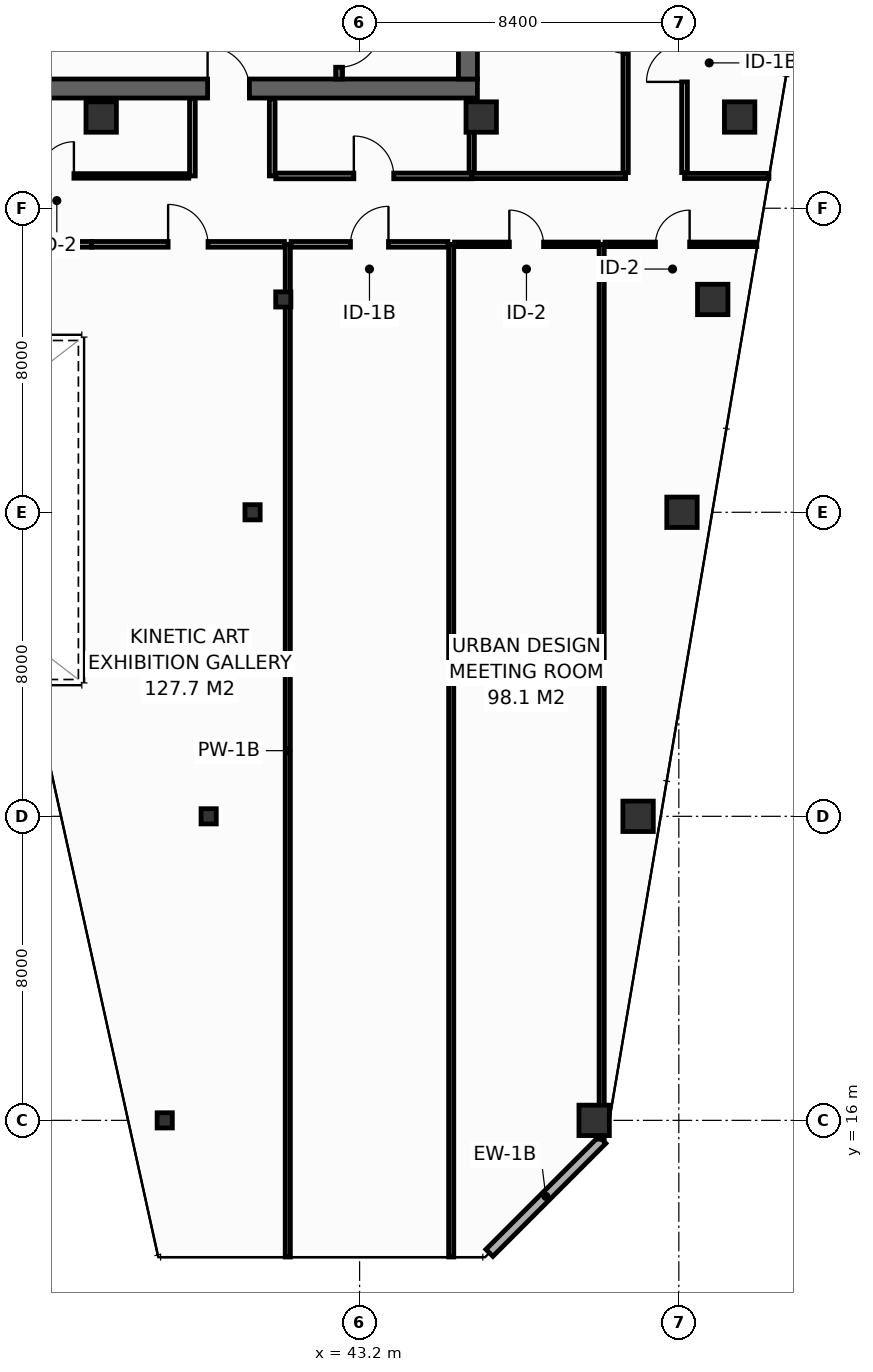
"""IFC4 building model, lengths in metres.
Left out: names, types, materials, properties, quantities, classifications, styles, units other than length and angle.
Written with IfcOpenShell. Run it as: python <this file> out.ifc"""

import sys

from ifc_helpers import new_model, si_unit, direction, frame, frame_2d, origin, origin_2d, place, context, subcontext, project, spatial, rectangle, hollow_rectangle, extrude, element, fill, save


model = new_model("IFC4")
c1 = context("Model", 3, precision=1e-05, world=origin(), true_north=direction((0.0, 1.0)))
c2 = subcontext(c1, "Body", "Model", "MODEL_VIEW")
j1 = project(units=[si_unit("LENGTHUNIT", "METRE"), si_unit("PLANEANGLEUNIT", "RADIAN")], contexts=[c1])
p1 = place(None, origin())
s1 = spatial("IfcSite", under=j1, at=p1, CompositionType="ELEMENT")
p2 = place(p1, origin())
s2 = spatial("IfcBuilding", under=s1, at=p2, CompositionType="ELEMENT")
p3 = place(p2, frame((0.0, 0.0, 205.6)))
s3 = spatial("IfcBuildingStorey", under=s2, at=p3, CompositionType="ELEMENT", Elevation=205.6)
p4 = place(p3, frame((13.6, 43.15, 0.0), z_axis=(0.0, 0.0, 1.0), x_axis=(1.0, 0.0, 0.0)))
e1 = element("IfcWall", 1, at=p4, inside=s3, PredefinedType="SHEAR", context=c2, shape_type="SweptSolid", body=[
    extrude(rectangle(XDim=32.7, YDim=0.5, at=frame_2d((16.35, 0.0))), origin(), (0.0, 0.0, 1.0), 3.55),
])
p5 = place(p4, frame((5.4, 0.0, 0.0)))
e2 = element("IfcOpeningElement", 2, at=p5, cuts=e1, PredefinedType="OPENING", context=c2, shape_type="SweptSolid", body=[
    extrude(rectangle(XDim=1.1, YDim=2.15, at=frame_2d((0.55, 1.075))), frame((0.0, 0.26, 0.0), z_axis=(0.0, -1.0, 0.0), x_axis=(1.0, 0.0, 0.0)), (0.0, 0.0, 1.0), 0.52),
])
p6 = place(p4, frame((25.6, 0.0, 0.0)))
e3 = element("IfcOpeningElement", 3, at=p6, cuts=e1, PredefinedType="OPENING", context=c2, shape_type="SweptSolid", body=[
    extrude(rectangle(XDim=1.1, YDim=2.15, at=frame_2d((0.55, 1.075))), frame((0.0, 0.26, 0.0), z_axis=(0.0, -1.0, 0.0), x_axis=(1.0, 0.0, 0.0)), (0.0, 0.0, 1.0), 0.52),
])
p7 = place(p3, frame((46.05, 43.4, 0.0), z_axis=(0.0, 0.0, 1.0), x_axis=(0.0, 1.0, 0.0)))
e4 = element("IfcWall", 4, at=p7, inside=s3, PredefinedType="SHEAR", context=c2, shape_type="SweptSolid", body=[
    extrude(rectangle(XDim=10.4, YDim=0.5, at=frame_2d((5.2, 0.0))), origin(), (0.0, 0.0, 1.0), 3.55),
])
for number, where, z_axis, x_axis in (
    (5, (36.4, 42.4, 0.0), (0.0, 0.0, 1.0), (1.0, 0.0, 0.0)),
    (6, (46.4, 42.4, 0.0), (0.0, 0.0, 1.0), (1.0, 0.0, 0.0)),
    (7, (53.2, 42.4, 0.0), (0.0, 0.0, 1.0), (1.0, 0.0, 0.0)),
    (8, (49.372, 16.0, 0.0), (0.0, 0.0, 1.0), (1.0, 0.0, 0.0)),
):
    element("IfcColumn", number, at=place(p3, frame(where, z_axis=z_axis, x_axis=x_axis)), inside=s3, PredefinedType="COLUMN", context=c2, shape_type="SweptSolid", body=[
        extrude(hollow_rectangle(XDim=0.8, YDim=0.8, WallThickness=0.036, at=origin_2d()), origin(), (0.0, 0.0, 1.0), 3.8),
    ])
p8 = place(p3, frame((38.072, 16.0, 0.0), z_axis=(0.0, 0.0, 1.0), x_axis=(1.0, 0.0, 0.0)))
e9 = element("IfcColumn", 9, at=p8, inside=s3, PredefinedType="COLUMN", context=c2, shape_type="SweptSolid", body=[
    extrude(hollow_rectangle(XDim=0.4, YDim=0.4, WallThickness=0.016, at=origin_2d()), origin(), (0.0, 0.0, 1.0), 3.8),
])
p9 = place(p3, frame((50.528, 24.0, 0.0), z_axis=(0.0, 0.0, 1.0), x_axis=(1.0, 0.0, 0.0)))
e10 = element("IfcColumn", 10, at=p9, inside=s3, PredefinedType="COLUMN", context=c2, shape_type="SweptSolid", body=[
    extrude(hollow_rectangle(XDim=0.8, YDim=0.8, WallThickness=0.036, at=origin_2d()), origin(), (0.0, 0.0, 1.0), 3.8),
])
p10 = place(p3, frame((39.228, 24.0, 0.0), z_axis=(0.0, 0.0, 1.0), x_axis=(1.0, 0.0, 0.0)))
e11 = element("IfcColumn", 11, at=p10, inside=s3, PredefinedType="COLUMN", context=c2, shape_type="SweptSolid", body=[
    extrude(hollow_rectangle(XDim=0.4, YDim=0.4, WallThickness=0.016, at=origin_2d()), origin(), (0.0, 0.0, 1.0), 3.8),
])
p11 = place(p3, frame((51.683, 32.0, 0.0), z_axis=(0.0, 0.0, 1.0), x_axis=(1.0, 0.0, 0.0)))
e12 = element("IfcColumn", 12, at=p11, inside=s3, PredefinedType="COLUMN", context=c2, shape_type="SweptSolid", body=[
    extrude(hollow_rectangle(XDim=0.8, YDim=0.8, WallThickness=0.036, at=origin_2d()), origin(), (0.0, 0.0, 1.0), 3.8),
])
p12 = place(p3, frame((40.383, 32.0, 0.0), z_axis=(0.0, 0.0, 1.0), x_axis=(1.0, 0.0, 0.0)))
e13 = element("IfcColumn", 13, at=p12, inside=s3, PredefinedType="COLUMN", context=c2, shape_type="SweptSolid", body=[
    extrude(hollow_rectangle(XDim=0.4, YDim=0.4, WallThickness=0.016, at=origin_2d()), origin(), (0.0, 0.0, 1.0), 3.8),
])
p13 = place(p3, frame((52.492, 37.6, 0.0), z_axis=(0.0, 0.0, 1.0), x_axis=(1.0, 0.0, 0.0)))
e14 = element("IfcColumn", 14, at=p13, inside=s3, PredefinedType="COLUMN", context=c2, shape_type="SweptSolid", body=[
    extrude(hollow_rectangle(XDim=0.8, YDim=0.8, WallThickness=0.036, at=origin_2d()), origin(), (0.0, 0.0, 1.0), 3.8),
])
p14 = place(p3, frame((41.192, 37.6, 0.0), z_axis=(0.0, 0.0, 1.0), x_axis=(1.0, 0.0, 0.0)))
e15 = element("IfcColumn", 15, at=p14, inside=s3, PredefinedType="COLUMN", context=c2, shape_type="SweptSolid", body=[
    extrude(hollow_rectangle(XDim=0.4, YDim=0.4, WallThickness=0.016, at=origin_2d()), origin(), (0.0, 0.0, 1.0), 3.8),
])
p15 = place(p3, frame((42.66, 53.8, 0.0), z_axis=(0.0, 0.0, 1.0), x_axis=(0.0, -1.0, 0.0)))
e16 = element("IfcWall", 16, at=p15, inside=s3, PredefinedType="SHEAR", context=c2, shape_type="SweptSolid", body=[
    extrude(rectangle(XDim=10.4, YDim=0.18, at=frame_2d((5.2, 0.0))), origin(), (0.0, 0.0, 1.0), 3.55),
])
p16 = place(p15, frame((8.99, 0.0, 0.0)))
e17 = element("IfcOpeningElement", 17, at=p16, cuts=e16, PredefinedType="OPENING", context=c2, shape_type="SweptSolid", body=[
    extrude(rectangle(XDim=1.1, YDim=2.15, at=frame_2d((0.55, 1.075))), frame((0.0, 0.1, 0.0), z_axis=(0.0, -1.0, 0.0), x_axis=(1.0, 0.0, 0.0)), (0.0, 0.0, 1.0), 0.2),
])
p17 = place(p3, frame((46.615, 12.513, 0.0), z_axis=(0.0, 0.0, 1.0), x_axis=(0.707135806771, 0.70707775441, 0.0)))
e18 = element("IfcWall", 18, at=p17, inside=s3, PredefinedType="STANDARD", context=c2, shape_type="SweptSolid", body=[
    extrude(rectangle(XDim=4.206, YDim=0.26, at=frame_2d((2.103, 0.0))), origin(), (0.0, 0.0, 1.0), 3.55),
])
p18 = place(p3, frame((46.15, 40.85, 0.0), z_axis=(0.0, 0.0, 1.0), x_axis=(1.0, 0.0, 0.0)))
e19 = element("IfcWall", 19, at=p18, inside=s3, PredefinedType="PARTITIONING", context=c2, shape_type="SweptSolid", body=[
    extrude(rectangle(XDim=4.05, YDim=0.14, at=frame_2d((2.025, 0.0))), origin(), (0.0, 0.0, 1.0), 3.55),
])
p19 = place(p3, frame((46.15, 40.94, 0.0), z_axis=(0.0, 0.0, 1.0), x_axis=(0.0, 1.0, 0.0)))
e20 = element("IfcWall", 20, at=p19, inside=s3, PredefinedType="PARTITIONING", context=c2, shape_type="SweptSolid", body=[
    extrude(rectangle(XDim=1.94, YDim=0.14, at=frame_2d((0.97, 0.0))), origin(), (0.0, 0.0, 1.0), 3.55),
])
p20 = place(p3, frame((50.2, 40.94, 0.0), z_axis=(0.0, 0.0, 1.0), x_axis=(0.0, 1.0, 0.0)))
e21 = element("IfcWall", 21, at=p20, inside=s3, PredefinedType="PARTITIONING", context=c2, shape_type="SweptSolid", body=[
    extrude(rectangle(XDim=7.17, YDim=0.14, at=frame_2d((3.585, 0.0))), origin(), (0.0, 0.0, 1.0), 2.835),
])
p21 = place(p20, frame((3.135, 0.0, 0.0)))
e22 = element("IfcOpeningElement", 22, at=p21, cuts=e21, PredefinedType="OPENING", context=c2, shape_type="SweptSolid", body=[
    extrude(rectangle(XDim=0.9, YDim=2.1, at=frame_2d((0.45, 1.05))), frame((0.0, 0.08, 0.0), z_axis=(0.0, -1.0, 0.0), x_axis=(1.0, 0.0, 0.0)), (0.0, 0.0, 1.0), 0.16),
])
p22 = place(p3, frame((51.75, 40.85, 0.0), z_axis=(0.0, 0.0, 1.0), x_axis=(1.0, 0.0, 0.0)))
e23 = element("IfcWall", 23, at=p22, inside=s3, PredefinedType="PARTITIONING", context=c2, shape_type="SweptSolid", body=[
    extrude(rectangle(XDim=2.222, YDim=0.135, at=frame_2d((1.111, 0.0))), origin(), (0.0, 0.0, 1.0), 3.035),
])
p23 = place(p3, frame((51.75, 40.938, 0.0), z_axis=(0.0, 0.0, 1.0), x_axis=(0.0, 1.0, 0.0)))
e24 = element("IfcWall", 24, at=p23, inside=s3, PredefinedType="PARTITIONING", context=c2, shape_type="SweptSolid", body=[
    extrude(rectangle(XDim=5.775, YDim=0.15, at=frame_2d((2.887, 0.0))), origin(), (0.0, 0.0, 1.0), 2.835),
])
p24 = place(p23, frame((2.387, 0.0, 0.0)))
e25 = element("IfcOpeningElement", 25, at=p24, cuts=e24, PredefinedType="OPENING", context=c2, shape_type="SweptSolid", body=[
    extrude(rectangle(XDim=1.0, YDim=2.15, at=frame_2d((0.5, 1.075))), frame((0.0, 0.085, 0.0), z_axis=(0.0, -1.0, 0.0), x_axis=(1.0, 0.0, 0.0)), (0.0, 0.0, 1.0), 0.17),
])
for number, where, z_axis, x_axis in (
    (26, (38.8, 40.85, 0.0), (0.0, 0.0, 1.0), (0.0, 1.0, 0.0)),
    (27, (40.9, 40.85, 0.0), (0.0, 0.0, 1.0), (0.0, 1.0, 0.0)),
):
    element("IfcWall", number, at=place(p3, frame(where, z_axis=z_axis, x_axis=x_axis)), inside=s3, PredefinedType="PARTITIONING", context=c2, shape_type="SweptSolid", body=[
        extrude(rectangle(XDim=2.03, YDim=0.15, at=frame_2d((1.015, 0.0))), origin(), (0.0, 0.0, 1.0), 3.55),
    ])
p25 = place(p3, frame((33.08, 40.85, 0.0), z_axis=(0.0, 0.0, 1.0), x_axis=(1.0, 0.0, 0.0)))
e28 = element("IfcWall", 28, at=p25, inside=s3, PredefinedType="PARTITIONING", context=c2, shape_type="SweptSolid", body=[
    extrude(rectangle(XDim=5.625, YDim=0.12, at=frame_2d((2.812, 0.0))), origin(), (0.0, 0.0, 1.0), 2.835),
])
p26 = place(p25, frame((1.702, 0.0, 0.0)))
e29 = element("IfcOpeningElement", 29, at=p26, cuts=e28, PredefinedType="OPENING", context=c2, shape_type="SweptSolid", body=[
    extrude(rectangle(XDim=0.9, YDim=2.1, at=frame_2d((0.45, 1.05))), frame((0.0, 0.07, 0.0), z_axis=(0.0, -1.0, 0.0), x_axis=(1.0, 0.0, 0.0)), (0.0, 0.0, 1.0), 0.14),
])
p27 = place(p3, frame((40.995, 40.85, 0.0), z_axis=(0.0, 0.0, 1.0), x_axis=(1.0, 0.0, 0.0)))
e30 = element("IfcWall", 30, at=p27, inside=s3, PredefinedType="PARTITIONING", context=c2, shape_type="SweptSolid", body=[
    extrude(rectangle(XDim=5.155, YDim=0.15, at=frame_2d((2.577, 0.0))), origin(), (0.0, 0.0, 1.0), 3.55),
])
p28 = place(p27, frame((2.053, 0.0, 0.0)))
e31 = element("IfcOpeningElement", 31, at=p28, cuts=e30, PredefinedType="OPENING", context=c2, shape_type="SweptSolid", body=[
    extrude(rectangle(XDim=1.05, YDim=2.15, at=frame_2d((0.525, 1.075))), frame((0.0, 0.085, 0.0), z_axis=(0.0, -1.0, 0.0), x_axis=(1.0, 0.0, 0.0)), (0.0, 0.0, 1.0), 0.17),
])
for number, where, z_axis, x_axis in (
    (32, (41.31, 12.405, 0.0), (0.0, 0.0, 1.0), (0.0, 1.0, 0.0)),
    (33, (45.61, 12.405, 0.0), (0.0, 0.0, 1.0), (0.0, 1.0, 0.0)),
):
    element("IfcWall", number, at=place(p3, frame(where, z_axis=z_axis, x_axis=x_axis)), inside=s3, PredefinedType="PARTITIONING", context=c2, shape_type="SweptSolid", body=[
        extrude(rectangle(XDim=26.645, YDim=0.135, at=frame_2d((13.323, 0.0))), origin(), (0.0, 0.0, 1.0), 2.835),
    ])
p29 = place(p3, frame((49.57, 15.506, 0.0), z_axis=(0.0, 0.0, 1.0), x_axis=(0.0, 1.0, 0.0)))
e34 = element("IfcWall", 34, at=p29, inside=s3, PredefinedType="PARTITIONING", context=c2, shape_type="SweptSolid", body=[
    extrude(rectangle(XDim=23.544, YDim=0.135, at=frame_2d((11.772, 0.0))), origin(), (0.0, 0.0, 1.0), 2.835),
])
p30 = place(p3, frame((23.85, 39.05, 0.0), z_axis=(0.0, 0.0, 1.0), x_axis=(1.0, 0.0, 0.0)))
e35 = element("IfcWall", 35, at=p30, inside=s3, PredefinedType="PARTITIONING", context=c2, shape_type="SweptSolid", body=[
    extrude(rectangle(XDim=12.3, YDim=0.15, at=frame_2d((6.15, 0.0))), origin(), (0.0, 0.0, 1.0), 3.55),
])
p31 = place(p3, frame((36.15, 39.05, 0.0), z_axis=(0.0, 0.0, 1.0), x_axis=(1.0, 0.0, 0.0)))
e36 = element("IfcWall", 36, at=p31, inside=s3, PredefinedType="PARTITIONING", context=c2, shape_type="SweptSolid", body=[
    extrude(rectangle(XDim=5.073, YDim=0.15, at=frame_2d((2.536, 0.0))), origin(), (0.0, 0.0, 1.0), 2.835),
])
p32 = place(p31, frame((2.011, 0.0, 0.0)))
e37 = element("IfcOpeningElement", 37, at=p32, cuts=e36, PredefinedType="OPENING", context=c2, shape_type="SweptSolid", body=[
    extrude(rectangle(XDim=1.05, YDim=2.15, at=frame_2d((0.525, 1.075))), frame((0.0, 0.085, 0.0), z_axis=(0.0, -1.0, 0.0), x_axis=(1.0, 0.0, 0.0)), (0.0, 0.0, 1.0), 0.17),
])
p33 = place(p3, frame((41.397, 39.05, 0.0), z_axis=(0.0, 0.0, 1.0), x_axis=(1.0, 0.0, 0.0)))
e38 = element("IfcWall", 38, at=p33, inside=s3, PredefinedType="PARTITIONING", context=c2, shape_type="SweptSolid", body=[
    extrude(rectangle(XDim=4.125, YDim=0.15, at=frame_2d((2.062, 0.0))), origin(), (0.0, 0.0, 1.0), 3.55),
])
p34 = place(p33, frame((1.562, 0.0, 0.0)))
e39 = element("IfcOpeningElement", 39, at=p34, cuts=e38, PredefinedType="OPENING", context=c2, shape_type="SweptSolid", body=[
    extrude(rectangle(XDim=1.0, YDim=2.15, at=frame_2d((0.5, 1.075))), frame((0.0, 0.085, 0.0), z_axis=(0.0, -1.0, 0.0), x_axis=(1.0, 0.0, 0.0)), (0.0, 0.0, 1.0), 0.17),
])
p35 = place(p3, frame((45.698, 39.05, 0.0), z_axis=(0.0, 0.0, 1.0), x_axis=(1.0, 0.0, 0.0)))
e40 = element("IfcWall", 40, at=p35, inside=s3, PredefinedType="PARTITIONING", context=c2, shape_type="SweptSolid", body=[
    extrude(rectangle(XDim=3.785, YDim=0.12, at=frame_2d((1.893, 0.0))), origin(), (0.0, 0.0, 1.0), 3.55),
])
p36 = place(p35, frame((1.443, 0.0, 0.0)))
e41 = element("IfcOpeningElement", 41, at=p36, cuts=e40, PredefinedType="OPENING", context=c2, shape_type="SweptSolid", body=[
    extrude(rectangle(XDim=0.9, YDim=2.1, at=frame_2d((0.45, 1.05))), frame((0.0, 0.07, 0.0), z_axis=(0.0, -1.0, 0.0), x_axis=(1.0, 0.0, 0.0)), (0.0, 0.0, 1.0), 0.14),
])
p37 = place(p3, frame((49.657, 39.05, 0.0), z_axis=(0.0, 0.0, 1.0), x_axis=(1.0, 0.0, 0.0)))
e42 = element("IfcWall", 42, at=p37, inside=s3, PredefinedType="PARTITIONING", context=c2, shape_type="SweptSolid", body=[
    extrude(rectangle(XDim=3.994, YDim=0.12, at=frame_2d((1.997, 0.0))), origin(), (0.0, 0.0, 1.0), 3.035),
])
p38 = place(p37, frame((1.327, 0.0, 0.0)))
e43 = element("IfcOpeningElement", 43, at=p38, cuts=e42, PredefinedType="OPENING", context=c2, shape_type="SweptSolid", body=[
    extrude(rectangle(XDim=0.9, YDim=2.1, at=frame_2d((0.45, 1.05))), frame((0.0, 0.07, 0.0), z_axis=(0.0, -1.0, 0.0), x_axis=(1.0, 0.0, 0.0)), (0.0, 0.0, 1.0), 0.14),
])
p39 = place(p16, origin())
e44 = element("IfcDoor", 44, at=p39, inside=s3, OperationType="SINGLE_SWING_LEFT", PredefinedType="DOOR", context=c2, shape_type="SweptSolid", body=[
    extrude(rectangle(XDim=1.1, YDim=2.15, at=frame_2d((0.55, 1.075))), frame((0.0, 0.025, 0.0), z_axis=(0.0, -1.0, 0.0), x_axis=(1.0, 0.0, 0.0)), (0.0, 0.0, 1.0), 0.05),
])
fill(e17, e44)
p40 = place(p6, origin())
e45 = element("IfcDoor", 45, at=p40, inside=s3, OperationType="SINGLE_SWING_LEFT", PredefinedType="DOOR", context=c2, shape_type="SweptSolid", body=[
    extrude(rectangle(XDim=1.1, YDim=2.15, at=frame_2d((0.55, 1.075))), frame((0.0, 0.025, 0.0), z_axis=(0.0, -1.0, 0.0), x_axis=(1.0, 0.0, 0.0)), (0.0, 0.0, 1.0), 0.05),
])
fill(e3, e45)
p41 = place(p21, origin())
e46 = element("IfcDoor", 46, at=p41, inside=s3, OperationType="SINGLE_SWING_RIGHT", PredefinedType="DOOR", context=c2, shape_type="SweptSolid", body=[
    extrude(rectangle(XDim=0.9, YDim=2.1, at=frame_2d((0.45, 1.05))), frame((0.0, 0.025, 0.0), z_axis=(0.0, -1.0, 0.0), x_axis=(1.0, 0.0, 0.0)), (0.0, 0.0, 1.0), 0.05),
])
fill(e22, e46)
p42 = place(p24, origin())
e47 = element("IfcDoor", 47, at=p42, inside=s3, OperationType="SINGLE_SWING_LEFT", PredefinedType="DOOR", context=c2, shape_type="SweptSolid", body=[
    extrude(rectangle(XDim=1.0, YDim=2.15, at=frame_2d((0.5, 1.075))), frame((0.0, 0.025, 0.0), z_axis=(0.0, -1.0, 0.0), x_axis=(1.0, 0.0, 0.0)), (0.0, 0.0, 1.0), 0.05),
])
fill(e25, e47)
p43 = place(p26, origin())
e48 = element("IfcDoor", 48, at=p43, inside=s3, OperationType="SINGLE_SWING_RIGHT", PredefinedType="DOOR", context=c2, shape_type="SweptSolid", body=[
    extrude(rectangle(XDim=0.9, YDim=2.1, at=frame_2d((0.45, 1.05))), frame((0.0, 0.025, 0.0), z_axis=(0.0, -1.0, 0.0), x_axis=(1.0, 0.0, 0.0)), (0.0, 0.0, 1.0), 0.05),
])
fill(e29, e48)
p44 = place(p28, origin())
e49 = element("IfcDoor", 49, at=p44, inside=s3, OperationType="SINGLE_SWING_LEFT", PredefinedType="DOOR", context=c2, shape_type="SweptSolid", body=[
    extrude(rectangle(XDim=1.05, YDim=2.15, at=frame_2d((0.525, 1.075))), frame((0.0, 0.025, 0.0), z_axis=(0.0, -1.0, 0.0), x_axis=(1.0, 0.0, 0.0)), (0.0, 0.0, 1.0), 0.05),
])
fill(e31, e49)
p45 = place(p32, origin())
e50 = element("IfcDoor", 50, at=p45, inside=s3, OperationType="SINGLE_SWING_LEFT", PredefinedType="DOOR", context=c2, shape_type="SweptSolid", body=[
    extrude(rectangle(XDim=1.05, YDim=2.15, at=frame_2d((0.525, 1.075))), frame((0.0, 0.025, 0.0), z_axis=(0.0, -1.0, 0.0), x_axis=(1.0, 0.0, 0.0)), (0.0, 0.0, 1.0), 0.05),
])
fill(e37, e50)
p46 = place(p34, origin())
e51 = element("IfcDoor", 51, at=p46, inside=s3, OperationType="SINGLE_SWING_RIGHT", PredefinedType="DOOR", context=c2, shape_type="SweptSolid", body=[
    extrude(rectangle(XDim=1.0, YDim=2.15, at=frame_2d((0.5, 1.075))), frame((0.0, 0.025, 0.0), z_axis=(0.0, -1.0, 0.0), x_axis=(1.0, 0.0, 0.0)), (0.0, 0.0, 1.0), 0.05),
])
fill(e39, e51)
p47 = place(p36, origin())
e52 = element("IfcDoor", 52, at=p47, inside=s3, OperationType="SINGLE_SWING_LEFT", PredefinedType="DOOR", context=c2, shape_type="SweptSolid", body=[
    extrude(rectangle(XDim=0.9, YDim=2.1, at=frame_2d((0.45, 1.05))), frame((0.0, 0.025, 0.0), z_axis=(0.0, -1.0, 0.0), x_axis=(1.0, 0.0, 0.0)), (0.0, 0.0, 1.0), 0.05),
])
fill(e41, e52)
p48 = place(p38, origin())
e53 = element("IfcDoor", 53, at=p48, inside=s3, OperationType="SINGLE_SWING_RIGHT", PredefinedType="DOOR", context=c2, shape_type="SweptSolid", body=[
    extrude(rectangle(XDim=0.9, YDim=2.1, at=frame_2d((0.45, 1.05))), frame((0.0, 0.025, 0.0), z_axis=(0.0, -1.0, 0.0), x_axis=(1.0, 0.0, 0.0)), (0.0, 0.0, 1.0), 0.05),
])
fill(e43, e53)
save(model, sys.argv[1])
